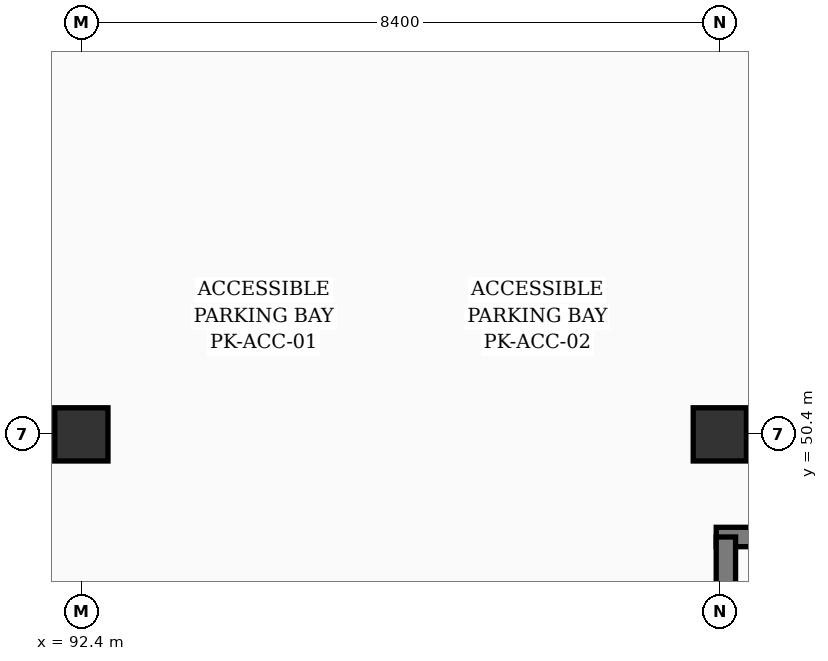
"""IFC4 building model, lengths in metres.
Left out: names, types, materials, properties, quantities, classifications, styles, units other than length and angle.
Written with IfcOpenShell. Run it as: python <this file> out.ifc"""

import sys

from ifc_helpers import new_model, si_unit, direction, frame, frame_2d, origin, origin_2d, place, context, subcontext, project, spatial, rectangle, extrude, element, save


model = new_model("IFC4")
c1 = context("Model", 3, precision=1e-05, world=origin(), true_north=direction((0.0, 1.0)))
c2 = subcontext(c1, "Body", "Model", "MODEL_VIEW")
j1 = project(units=[si_unit("LENGTHUNIT", "METRE"), si_unit("PLANEANGLEUNIT", "RADIAN")], contexts=[c1])
p1 = place(None, origin())
s1 = spatial("IfcSite", under=j1, at=p1, CompositionType="ELEMENT")
p2 = place(p1, origin())
s2 = spatial("IfcBuilding", under=s1, at=p2, CompositionType="ELEMENT")
p3 = place(p2, frame((0.0, 0.0, -4.2)))
s3 = spatial("IfcBuildingStorey", under=s2, at=p3, CompositionType="ELEMENT", Elevation=-4.2)
for number, where, z_axis, x_axis in (
    (1, (92.4, 50.4, 0.0), (0.0, 0.0, 1.0), (1.0, 0.0, 0.0)),
    (2, (100.8, 50.4, 0.0), (0.0, 0.0, 1.0), (1.0, 0.0, 0.0)),
):
    element("IfcColumn", number, at=place(p3, frame(where, z_axis=z_axis, x_axis=x_axis)), inside=s3, PredefinedType="COLUMN", context=c2, shape_type="SweptSolid", body=[
        extrude(rectangle(XDim=0.7, YDim=0.7, at=origin_2d()), origin(), (0.0, 0.0, 1.0), 4.2),
    ])
p4 = place(p3, frame((100.752, 49.05, -0.4), z_axis=(0.0, 0.0, 1.0), x_axis=(1.0, 0.0, 0.0)))
e3 = element("IfcWall", 3, at=p4, inside=s3, PredefinedType="SOLIDWALL", context=c2, shape_type="SweptSolid", body=[
    extrude(rectangle(XDim=8.225, YDim=0.255, at=frame_2d((4.113, 0.0))), origin(), (0.0, 0.0, 1.0), 4.25),
])
p5 = place(p3, frame((100.88, 45.2, -0.4), z_axis=(0.0, 0.0, 1.0), x_axis=(0.0, 1.0, 0.0)))
e4 = element("IfcWall", 4, at=p5, inside=s3, PredefinedType="SOLIDWALL", context=c2, shape_type="SweptSolid", body=[
    extrude(rectangle(XDim=3.85, YDim=0.255, at=frame_2d((1.925, 0.0))), origin(), (0.0, 0.0, 1.0), 4.25),
])
save(model, sys.argv[1])
